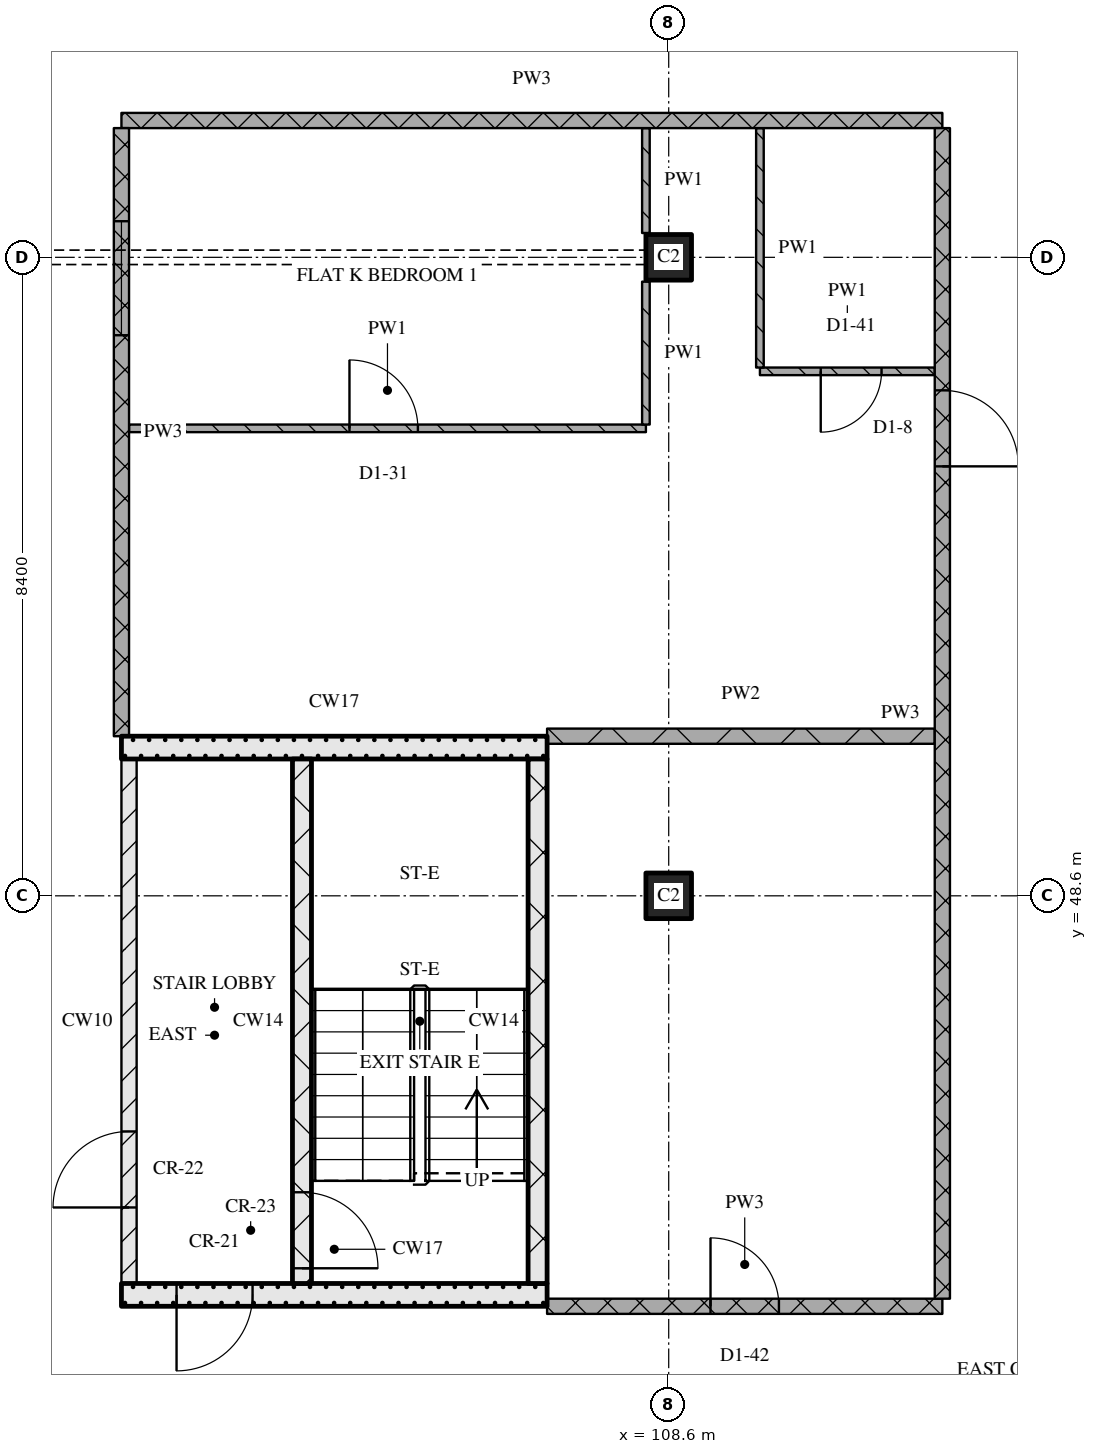
"""IFC4 building model, lengths in metres.
Left out: names, types, materials, properties, quantities, classifications, styles, units other than length and angle.
Written with IfcOpenShell. Run it as: python <this file> out.ifc"""

import sys

from ifc_helpers import new_model, si_unit, direction, frame, frame_2d, origin, origin_2d, place, context, subcontext, project, spatial, rectangle, extrude, element, fill, save


model = new_model("IFC4")
c1 = context("Model", 3, precision=1e-05, world=origin(), true_north=direction((0.0, 1.0)))
c2 = subcontext(c1, "Body", "Model", "MODEL_VIEW")
j1 = project(units=[si_unit("LENGTHUNIT", "METRE"), si_unit("PLANEANGLEUNIT", "RADIAN")], contexts=[c1])
p1 = place(None, origin())
s1 = spatial("IfcSite", under=j1, at=p1, CompositionType="ELEMENT")
p2 = place(p1, origin())
s2 = spatial("IfcBuilding", under=s1, at=p2, CompositionType="ELEMENT")
p3 = place(p2, frame((0.0, 0.0, 205.5)))
s3 = spatial("IfcBuildingStorey", under=s2, at=p3, CompositionType="ELEMENT", Elevation=205.5)
for number, where, z_axis, x_axis in (
    (1, (108.6, 48.6, 0.0), (0.0, 0.0, 1.0), (1.0, 0.0, 0.0)),
    (2, (108.6, 57.0, 0.0), (0.0, 0.0, 1.0), (1.0, 0.0, 0.0)),
):
    element("IfcColumn", number, at=place(p3, frame(where, z_axis=z_axis, x_axis=x_axis)), inside=s3, PredefinedType="COLUMN", context=c2, shape_type="SweptSolid", body=[
        extrude(rectangle(XDim=0.6, YDim=0.6, at=origin_2d()), origin(), (0.0, 0.0, 1.0), 3.6),
    ])
p4 = place(p3, frame((101.4, 43.35, 0.0), z_axis=(0.0, 0.0, 1.0), x_axis=(1.0, 0.0, 0.0)))
e3 = element("IfcWall", 3, at=p4, inside=s3, PredefinedType="SOLIDWALL", context=c2, shape_type="SweptSolid", body=[
    extrude(rectangle(XDim=5.6, YDim=0.3, at=frame_2d((2.8, 0.0))), origin(), (0.0, 0.0, 1.0), 3.32),
])
p5 = place(p4, frame((0.725, 0.0, 0.0)))
e4 = element("IfcOpeningElement", 4, at=p5, cuts=e3, PredefinedType="OPENING", context=c2, shape_type="SweptSolid", body=[
    extrude(rectangle(XDim=1.0, YDim=2.1, at=frame_2d((0.5, 1.05))), frame((0.0, 0.16, 0.0), z_axis=(0.0, -1.0, 0.0), x_axis=(1.0, 0.0, 0.0)), (0.0, 0.0, 1.0), 0.32),
])
p6 = place(p3, frame((101.5, 43.5, 0.0), z_axis=(0.0, 0.0, 1.0), x_axis=(0.0, 1.0, 0.0)))
e5 = element("IfcWall", 5, at=p6, inside=s3, PredefinedType="PARTITIONING", context=c2, shape_type="SweptSolid", body=[
    extrude(rectangle(XDim=6.9, YDim=0.2, at=frame_2d((3.45, 0.0))), origin(), (0.0, 0.0, 1.0), 3.32),
])
p7 = place(p6, frame((1.0, 0.0, 0.0)))
e6 = element("IfcOpeningElement", 6, at=p7, cuts=e5, PredefinedType="OPENING", context=c2, shape_type="SweptSolid", body=[
    extrude(rectangle(XDim=1.0, YDim=2.1, at=frame_2d((0.5, 1.05))), frame((0.0, 0.11, 0.0), z_axis=(0.0, -1.0, 0.0), x_axis=(1.0, 0.0, 0.0)), (0.0, 0.0, 1.0), 0.22),
])
p8 = place(p3, frame((103.775, 43.5, 0.0), z_axis=(0.0, 0.0, 1.0), x_axis=(0.0, 1.0, 0.0)))
e7 = element("IfcWall", 7, at=p8, inside=s3, PredefinedType="SOLIDWALL", context=c2, shape_type="SweptSolid", body=[
    extrude(rectangle(XDim=6.9, YDim=0.25, at=frame_2d((3.45, 0.0))), origin(), (0.0, 0.0, 1.0), 3.32),
])
p9 = place(p8, frame((0.2, 0.0, 0.0)))
e8 = element("IfcOpeningElement", 8, at=p9, cuts=e7, PredefinedType="OPENING", context=c2, shape_type="SweptSolid", body=[
    extrude(rectangle(XDim=1.0, YDim=2.1, at=frame_2d((0.5, 1.05))), frame((0.0, 0.135, 0.0), z_axis=(0.0, -1.0, 0.0), x_axis=(1.0, 0.0, 0.0)), (0.0, 0.0, 1.0), 0.27),
])
p10 = place(p3, frame((106.875, 43.5, 0.0), z_axis=(0.0, 0.0, 1.0), x_axis=(0.0, 1.0, 0.0)))
e9 = element("IfcWall", 9, at=p10, inside=s3, PredefinedType="SOLIDWALL", context=c2, shape_type="SweptSolid", body=[
    extrude(rectangle(XDim=6.9, YDim=0.25, at=frame_2d((3.45, 0.0))), origin(), (0.0, 0.0, 1.0), 3.32),
])
p11 = place(p3, frame((101.4, 50.55, 0.0), z_axis=(0.0, 0.0, 1.0), x_axis=(1.0, 0.0, 0.0)))
e10 = element("IfcWall", 10, at=p11, inside=s3, PredefinedType="SOLIDWALL", context=c2, shape_type="SweptSolid", body=[
    extrude(rectangle(XDim=5.6, YDim=0.3, at=frame_2d((2.8, 0.0))), origin(), (0.0, 0.0, 1.0), 3.32),
])
p12 = place(p3, frame((107.0, 43.2, 0.0), z_axis=(0.0, 0.0, 1.0), x_axis=(1.0, 0.0, 0.0)))
e11 = element("IfcWall", 11, at=p12, inside=s3, PredefinedType="PARTITIONING", context=c2, shape_type="SweptSolid", body=[
    extrude(rectangle(XDim=5.2, YDim=0.2, at=frame_2d((2.6, 0.0))), origin(), (0.0, 0.0, 1.0), 3.32),
])
p13 = place(p12, frame((2.15, 0.0, 0.0)))
e12 = element("IfcOpeningElement", 12, at=p13, cuts=e11, PredefinedType="OPENING", context=c2, shape_type="SweptSolid", body=[
    extrude(rectangle(XDim=0.9, YDim=2.1, at=frame_2d((0.45, 1.05))), frame((0.0, 0.11, 0.0), z_axis=(0.0, -1.0, 0.0), x_axis=(1.0, 0.0, 0.0)), (0.0, 0.0, 1.0), 0.22),
])
p14 = place(p3, frame((107.0, 50.7, 0.0), z_axis=(0.0, 0.0, 1.0), x_axis=(1.0, 0.0, 0.0)))
e13 = element("IfcWall", 13, at=p14, inside=s3, PredefinedType="PARTITIONING", context=c2, shape_type="SweptSolid", body=[
    extrude(rectangle(XDim=5.1, YDim=0.2, at=frame_2d((2.55, 0.0))), origin(), (0.0, 0.0, 1.0), 3.32),
])
p15 = place(p3, frame((101.5, 54.75, 0.0), z_axis=(0.0, 0.0, 1.0), x_axis=(1.0, 0.0, 0.0)))
e14 = element("IfcWall", 14, at=p15, inside=s3, PredefinedType="PARTITIONING", context=c2, shape_type="SweptSolid", body=[
    extrude(rectangle(XDim=6.8, YDim=0.1, at=frame_2d((3.4, 0.0))), origin(), (0.0, 0.0, 1.0), 3.32),
])
p16 = place(p15, frame((2.9, 0.0, 0.0)))
e15 = element("IfcOpeningElement", 15, at=p16, cuts=e14, PredefinedType="OPENING", context=c2, shape_type="SweptSolid", body=[
    extrude(rectangle(XDim=0.9, YDim=2.1, at=frame_2d((0.45, 1.05))), frame((0.0, 0.06, 0.0), z_axis=(0.0, -1.0, 0.0), x_axis=(1.0, 0.0, 0.0)), (0.0, 0.0, 1.0), 0.12),
])
p17 = place(p3, frame((109.8, 55.5, 0.0), z_axis=(0.0, 0.0, 1.0), x_axis=(1.0, 0.0, 0.0)))
e16 = element("IfcWall", 16, at=p17, inside=s3, PredefinedType="PARTITIONING", context=c2, shape_type="SweptSolid", body=[
    extrude(rectangle(XDim=2.3, YDim=0.1, at=frame_2d((1.15, 0.0))), origin(), (0.0, 0.0, 1.0), 3.32),
])
p18 = place(p17, frame((0.8, 0.0, 0.0)))
e17 = element("IfcOpeningElement", 17, at=p18, cuts=e16, PredefinedType="OPENING", context=c2, shape_type="SweptSolid", body=[
    extrude(rectangle(XDim=0.8, YDim=2.1, at=frame_2d((0.4, 1.05))), frame((0.0, 0.06, 0.0), z_axis=(0.0, -1.0, 0.0), x_axis=(1.0, 0.0, 0.0)), (0.0, 0.0, 1.0), 0.12),
])
p19 = place(p3, frame((101.4, 58.8, 0.0), z_axis=(0.0, 0.0, 1.0), x_axis=(1.0, 0.0, 0.0)))
e18 = element("IfcWall", 18, at=p19, inside=s3, PredefinedType="PARTITIONING", context=c2, shape_type="SweptSolid", body=[
    extrude(rectangle(XDim=10.8, YDim=0.2, at=frame_2d((5.4, 0.0))), origin(), (0.0, 0.0, 1.0), 3.32),
])
p20 = place(p3, frame((101.4, 58.7, 0.0), z_axis=(0.0, 0.0, 1.0), x_axis=(0.0, -1.0, 0.0)))
e19 = element("IfcWall", 19, at=p20, inside=s3, PredefinedType="PARTITIONING", context=c2, shape_type="SweptSolid", body=[
    extrude(rectangle(XDim=8.0, YDim=0.2, at=frame_2d((4.0, 0.0))), origin(), (0.0, 0.0, 1.0), 3.32),
])
p21 = place(p20, frame((1.225, 0.0, 0.9)))
e20 = element("IfcOpeningElement", 20, at=p21, cuts=e19, PredefinedType="OPENING", context=c2, shape_type="SweptSolid", body=[
    extrude(rectangle(XDim=1.5, YDim=1.5, at=frame_2d((0.75, 0.75))), frame((0.0, 0.11, 0.0), z_axis=(0.0, -1.0, 0.0), x_axis=(1.0, 0.0, 0.0)), (0.0, 0.0, 1.0), 0.22),
])
p22 = place(p3, frame((108.3, 56.68, 0.0), z_axis=(0.0, 0.0, 1.0), x_axis=(0.0, -1.0, 0.0)))
e21 = element("IfcWall", 21, at=p22, inside=s3, PredefinedType="PARTITIONING", context=c2, shape_type="SweptSolid", body=[
    extrude(rectangle(XDim=1.88, YDim=0.1, at=frame_2d((0.94, 0.0))), origin(), (0.0, 0.0, 1.0), 3.32),
])
p23 = place(p3, frame((108.3, 58.7, 0.0), z_axis=(0.0, 0.0, 1.0), x_axis=(0.0, -1.0, 0.0)))
e22 = element("IfcWall", 22, at=p23, inside=s3, PredefinedType="PARTITIONING", context=c2, shape_type="SweptSolid", body=[
    extrude(rectangle(XDim=1.38, YDim=0.1, at=frame_2d((0.69, 0.0))), origin(), (0.0, 0.0, 1.0), 3.32),
])
p24 = place(p3, frame((109.8, 58.7, 0.0), z_axis=(0.0, 0.0, 1.0), x_axis=(0.0, -1.0, 0.0)))
e23 = element("IfcWall", 23, at=p24, inside=s3, PredefinedType="PARTITIONING", context=c2, shape_type="SweptSolid", body=[
    extrude(rectangle(XDim=3.15, YDim=0.1, at=frame_2d((1.575, 0.0))), origin(), (0.0, 0.0, 1.0), 3.32),
])
p25 = place(p3, frame((112.2, 43.3, 0.0), z_axis=(0.0, 0.0, 1.0), x_axis=(0.0, 1.0, 0.0)))
e24 = element("IfcWall", 24, at=p25, inside=s3, PredefinedType="PARTITIONING", context=c2, shape_type="SweptSolid", body=[
    extrude(rectangle(XDim=15.4, YDim=0.2, at=frame_2d((7.7, 0.0))), origin(), (0.0, 0.0, 1.0), 3.32),
])
p26 = place(p25, frame((10.95, 0.0, 0.0)))
e25 = element("IfcOpeningElement", 25, at=p26, cuts=e24, PredefinedType="OPENING", context=c2, shape_type="SweptSolid", body=[
    extrude(rectangle(XDim=1.0, YDim=2.1, at=frame_2d((0.5, 1.05))), frame((0.0, 0.11, 0.0), z_axis=(0.0, -1.0, 0.0), x_axis=(1.0, 0.0, 0.0)), (0.0, 0.0, 1.0), 0.22),
])
p27 = place(p5, origin())
e26 = element("IfcDoor", 26, at=p27, inside=s3, OperationType="SINGLE_SWING_RIGHT", PredefinedType="DOOR", context=c2, shape_type="SweptSolid", body=[
    extrude(rectangle(XDim=1.0, YDim=2.1, at=frame_2d((0.5, 1.05))), frame((0.0, 0.025, 0.0), z_axis=(0.0, -1.0, 0.0), x_axis=(1.0, 0.0, 0.0)), (0.0, 0.0, 1.0), 0.05),
])
fill(e4, e26)
p28 = place(p9, origin())
e27 = element("IfcDoor", 27, at=p28, inside=s3, OperationType="SINGLE_SWING_RIGHT", PredefinedType="DOOR", context=c2, shape_type="SweptSolid", body=[
    extrude(rectangle(XDim=1.0, YDim=2.1, at=frame_2d((0.5, 1.05))), frame((0.0, 0.025, 0.0), z_axis=(0.0, -1.0, 0.0), x_axis=(1.0, 0.0, 0.0)), (0.0, 0.0, 1.0), 0.05),
])
fill(e8, e27)
p29 = place(p7, origin())
e28 = element("IfcDoor", 28, at=p29, inside=s3, OperationType="SINGLE_SWING_LEFT", PredefinedType="DOOR", context=c2, shape_type="SweptSolid", body=[
    extrude(rectangle(XDim=1.0, YDim=2.1, at=frame_2d((0.5, 1.05))), frame((0.0, 0.025, 0.0), z_axis=(0.0, -1.0, 0.0), x_axis=(1.0, 0.0, 0.0)), (0.0, 0.0, 1.0), 0.05),
])
fill(e6, e28)
p30 = place(p13, origin())
e29 = element("IfcDoor", 29, at=p30, inside=s3, OperationType="SINGLE_SWING_LEFT", PredefinedType="DOOR", context=c2, shape_type="SweptSolid", body=[
    extrude(rectangle(XDim=0.9, YDim=2.1, at=frame_2d((0.45, 1.05))), frame((0.0, 0.025, 0.0), z_axis=(0.0, -1.0, 0.0), x_axis=(1.0, 0.0, 0.0)), (0.0, 0.0, 1.0), 0.05),
])
fill(e12, e29)
p31 = place(p16, origin())
e30 = element("IfcDoor", 30, at=p31, inside=s3, OperationType="SINGLE_SWING_LEFT", PredefinedType="DOOR", context=c2, shape_type="SweptSolid", body=[
    extrude(rectangle(XDim=0.9, YDim=2.1, at=frame_2d((0.45, 1.05))), frame((0.0, 0.025, 0.0), z_axis=(0.0, -1.0, 0.0), x_axis=(1.0, 0.0, 0.0)), (0.0, 0.0, 1.0), 0.05),
])
fill(e15, e30)
p32 = place(p18, origin())
e31 = element("IfcDoor", 31, at=p32, inside=s3, OperationType="SINGLE_SWING_RIGHT", PredefinedType="DOOR", context=c2, shape_type="SweptSolid", body=[
    extrude(rectangle(XDim=0.8, YDim=2.1, at=frame_2d((0.4, 1.05))), frame((0.0, 0.025, 0.0), z_axis=(0.0, -1.0, 0.0), x_axis=(1.0, 0.0, 0.0)), (0.0, 0.0, 1.0), 0.05),
])
fill(e17, e31)
p33 = place(p26, origin())
e32 = element("IfcDoor", 32, at=p33, inside=s3, OperationType="SINGLE_SWING_RIGHT", PredefinedType="DOOR", context=c2, shape_type="SweptSolid", body=[
    extrude(rectangle(XDim=1.0, YDim=2.1, at=frame_2d((0.5, 1.05))), frame((0.0, 0.025, 0.0), z_axis=(0.0, -1.0, 0.0), x_axis=(1.0, 0.0, 0.0)), (0.0, 0.0, 1.0), 0.05),
])
fill(e25, e32)
p34 = place(p21, origin())
e33 = element("IfcWindow", 33, at=p34, inside=s3, PartitioningType="SINGLE_PANEL", PredefinedType="WINDOW", context=c2, shape_type="SweptSolid", body=[
    extrude(rectangle(XDim=1.5, YDim=1.5, at=frame_2d((0.75, 0.75))), frame((0.0, 0.03, 0.0), z_axis=(0.0, -1.0, 0.0), x_axis=(1.0, 0.0, 0.0)), (0.0, 0.0, 1.0), 0.06),
])
fill(e20, e33)
save(model, sys.argv[1])
